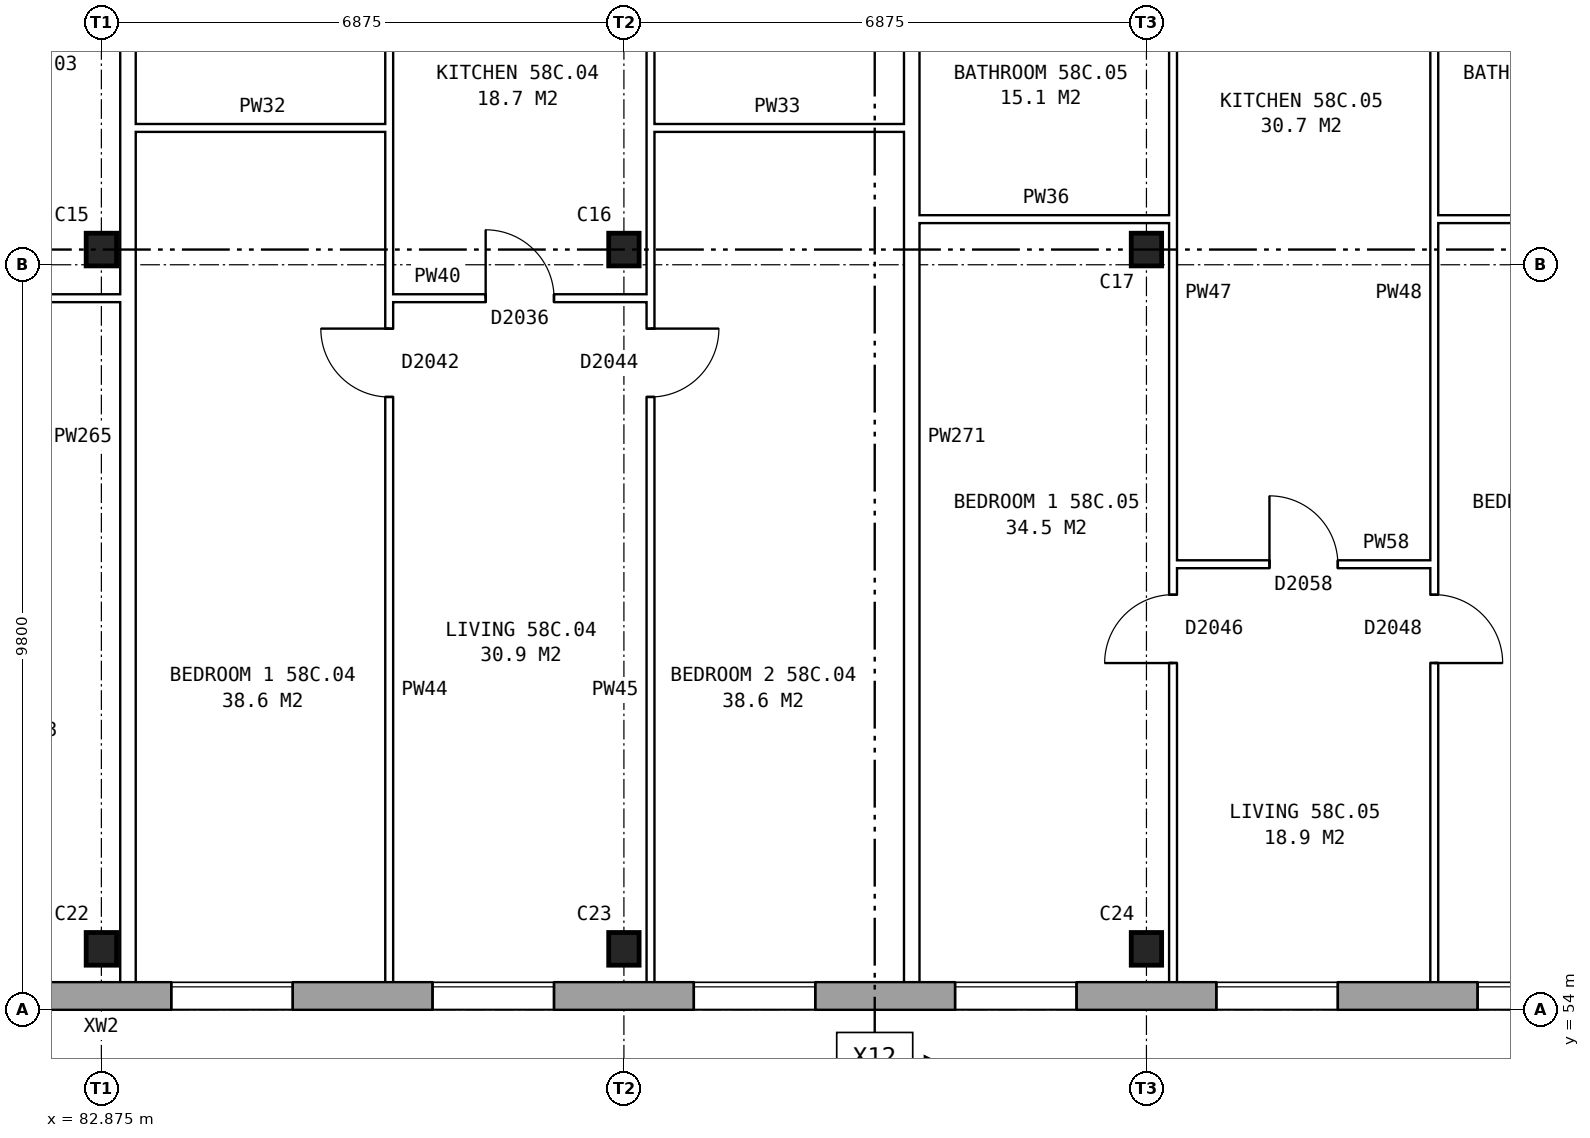
"""IFC4 building model, lengths in metres.
Left out: names, types, materials, properties, quantities, classifications, styles, units other than length and angle.
Written with IfcOpenShell. Run it as: python <this file> out.ifc"""

import sys

from ifc_helpers import new_model, si_unit, direction, frame, frame_2d, origin, origin_2d, place, context, subcontext, project, spatial, rectangle, i_section, extrude, element, fill, save


model = new_model("IFC4")
c1 = context("Model", 3, precision=1e-05, world=origin(), true_north=direction((0.0, 1.0)))
c2 = subcontext(c1, "Body", "Model", "MODEL_VIEW")
j1 = project(units=[si_unit("LENGTHUNIT", "METRE"), si_unit("PLANEANGLEUNIT", "RADIAN")], contexts=[c1])
p1 = place(None, origin())
s1 = spatial("IfcSite", under=j1, at=p1, CompositionType="ELEMENT")
p2 = place(p1, origin())
s2 = spatial("IfcBuilding", under=s1, at=p2, CompositionType="ELEMENT")
p3 = place(p2, frame((0.0, 0.0, 205.9)))
s3 = spatial("IfcBuildingStorey", under=s2, at=p3, CompositionType="ELEMENT", Elevation=205.9)
for number, where, z_axis, x_axis in (
    (1, (82.875, 54.8, 0.0), (0.0, 0.0, 1.0), (1.0, 0.0, 0.0)),
    (2, (89.75, 54.8, 0.0), (0.0, 0.0, 1.0), (1.0, 0.0, 0.0)),
    (3, (96.625, 54.8, 0.0), (0.0, 0.0, 1.0), (1.0, 0.0, 0.0)),
    (4, (82.875, 64.0, 0.0), (0.0, 0.0, 1.0), (1.0, 0.0, 0.0)),
    (5, (89.75, 64.0, 0.0), (0.0, 0.0, 1.0), (1.0, 0.0, 0.0)),
    (6, (96.625, 64.0, 0.0), (0.0, 0.0, 1.0), (1.0, 0.0, 0.0)),
):
    element("IfcColumn", number, at=place(p3, frame(where, z_axis=z_axis, x_axis=x_axis)), inside=s3, PredefinedType="COLUMN", context=c2, shape_type="SweptSolid", body=[
        extrude(i_section(OverallWidth=0.4, OverallDepth=0.43, WebThickness=0.04, FlangeThickness=0.04, at=origin_2d()), origin(), (0.0, 0.0, 1.0), 2.85),
    ])
p4 = place(p3, frame((75.95, 54.18, 0.0), z_axis=(0.0, 0.0, 1.0), x_axis=(1.0, 0.0, 0.0)))
e7 = element("IfcWall", 7, at=p4, inside=s3, PredefinedType="STANDARD", context=c2, shape_type="SweptSolid", body=[
    extrude(rectangle(XDim=55.1, YDim=0.36, at=frame_2d((27.55, 0.0))), origin(), (0.0, 0.0, 1.0), 2.85),
])
p5 = place(p4, frame((0.969, 0.0, 0.8)))
e8 = element("IfcOpeningElement", 8, at=p5, cuts=e7, PredefinedType="OPENING", context=c2, shape_type="SweptSolid", body=[
    extrude(rectangle(XDim=1.6, YDim=1.8, at=frame_2d((0.8, 0.9))), frame((0.0, 0.19, 0.0), z_axis=(0.0, -1.0, 0.0), x_axis=(1.0, 0.0, 0.0)), (0.0, 0.0, 1.0), 0.38),
])
p6 = place(p4, frame((4.406, 0.0, 0.8)))
e9 = element("IfcOpeningElement", 9, at=p6, cuts=e7, PredefinedType="OPENING", context=c2, shape_type="SweptSolid", body=[
    extrude(rectangle(XDim=1.6, YDim=1.8, at=frame_2d((0.8, 0.9))), frame((0.0, 0.19, 0.0), z_axis=(0.0, -1.0, 0.0), x_axis=(1.0, 0.0, 0.0)), (0.0, 0.0, 1.0), 0.38),
])
p7 = place(p4, frame((7.844, 0.0, 0.8)))
e10 = element("IfcOpeningElement", 10, at=p7, cuts=e7, PredefinedType="OPENING", context=c2, shape_type="SweptSolid", body=[
    extrude(rectangle(XDim=1.6, YDim=1.8, at=frame_2d((0.8, 0.9))), frame((0.0, 0.19, 0.0), z_axis=(0.0, -1.0, 0.0), x_axis=(1.0, 0.0, 0.0)), (0.0, 0.0, 1.0), 0.38),
])
p8 = place(p4, frame((11.281, 0.0, 0.8)))
e11 = element("IfcOpeningElement", 11, at=p8, cuts=e7, PredefinedType="OPENING", context=c2, shape_type="SweptSolid", body=[
    extrude(rectangle(XDim=1.6, YDim=1.8, at=frame_2d((0.8, 0.9))), frame((0.0, 0.19, 0.0), z_axis=(0.0, -1.0, 0.0), x_axis=(1.0, 0.0, 0.0)), (0.0, 0.0, 1.0), 0.38),
])
p9 = place(p4, frame((14.719, 0.0, 0.8)))
e12 = element("IfcOpeningElement", 12, at=p9, cuts=e7, PredefinedType="OPENING", context=c2, shape_type="SweptSolid", body=[
    extrude(rectangle(XDim=1.6, YDim=1.8, at=frame_2d((0.8, 0.9))), frame((0.0, 0.19, 0.0), z_axis=(0.0, -1.0, 0.0), x_axis=(1.0, 0.0, 0.0)), (0.0, 0.0, 1.0), 0.38),
])
p10 = place(p4, frame((18.156, 0.0, 0.8)))
e13 = element("IfcOpeningElement", 13, at=p10, cuts=e7, PredefinedType="OPENING", context=c2, shape_type="SweptSolid", body=[
    extrude(rectangle(XDim=1.6, YDim=1.8, at=frame_2d((0.8, 0.9))), frame((0.0, 0.19, 0.0), z_axis=(0.0, -1.0, 0.0), x_axis=(1.0, 0.0, 0.0)), (0.0, 0.0, 1.0), 0.38),
])
p11 = place(p4, frame((21.594, 0.0, 0.8)))
e14 = element("IfcOpeningElement", 14, at=p11, cuts=e7, PredefinedType="OPENING", context=c2, shape_type="SweptSolid", body=[
    extrude(rectangle(XDim=1.6, YDim=1.8, at=frame_2d((0.8, 0.9))), frame((0.0, 0.19, 0.0), z_axis=(0.0, -1.0, 0.0), x_axis=(1.0, 0.0, 0.0)), (0.0, 0.0, 1.0), 0.38),
])
p12 = place(p4, frame((25.031, 0.0, 0.8)))
e15 = element("IfcOpeningElement", 15, at=p12, cuts=e7, PredefinedType="OPENING", context=c2, shape_type="SweptSolid", body=[
    extrude(rectangle(XDim=1.6, YDim=1.8, at=frame_2d((0.8, 0.9))), frame((0.0, 0.19, 0.0), z_axis=(0.0, -1.0, 0.0), x_axis=(1.0, 0.0, 0.0)), (0.0, 0.0, 1.0), 0.38),
])
p13 = place(p4, frame((28.469, 0.0, 0.8)))
e16 = element("IfcOpeningElement", 16, at=p13, cuts=e7, PredefinedType="OPENING", context=c2, shape_type="SweptSolid", body=[
    extrude(rectangle(XDim=1.6, YDim=1.8, at=frame_2d((0.8, 0.9))), frame((0.0, 0.19, 0.0), z_axis=(0.0, -1.0, 0.0), x_axis=(1.0, 0.0, 0.0)), (0.0, 0.0, 1.0), 0.38),
])
p14 = place(p4, frame((31.906, 0.0, 0.8)))
e17 = element("IfcOpeningElement", 17, at=p14, cuts=e7, PredefinedType="OPENING", context=c2, shape_type="SweptSolid", body=[
    extrude(rectangle(XDim=1.6, YDim=1.8, at=frame_2d((0.8, 0.9))), frame((0.0, 0.19, 0.0), z_axis=(0.0, -1.0, 0.0), x_axis=(1.0, 0.0, 0.0)), (0.0, 0.0, 1.0), 0.38),
])
p15 = place(p4, frame((35.344, 0.0, 0.8)))
e18 = element("IfcOpeningElement", 18, at=p15, cuts=e7, PredefinedType="OPENING", context=c2, shape_type="SweptSolid", body=[
    extrude(rectangle(XDim=1.6, YDim=1.8, at=frame_2d((0.8, 0.9))), frame((0.0, 0.19, 0.0), z_axis=(0.0, -1.0, 0.0), x_axis=(1.0, 0.0, 0.0)), (0.0, 0.0, 1.0), 0.38),
])
p16 = place(p4, frame((38.781, 0.0, 0.8)))
e19 = element("IfcOpeningElement", 19, at=p16, cuts=e7, PredefinedType="OPENING", context=c2, shape_type="SweptSolid", body=[
    extrude(rectangle(XDim=1.6, YDim=1.8, at=frame_2d((0.8, 0.9))), frame((0.0, 0.19, 0.0), z_axis=(0.0, -1.0, 0.0), x_axis=(1.0, 0.0, 0.0)), (0.0, 0.0, 1.0), 0.38),
])
p17 = place(p4, frame((42.219, 0.0, 0.8)))
e20 = element("IfcOpeningElement", 20, at=p17, cuts=e7, PredefinedType="OPENING", context=c2, shape_type="SweptSolid", body=[
    extrude(rectangle(XDim=1.6, YDim=1.8, at=frame_2d((0.8, 0.9))), frame((0.0, 0.19, 0.0), z_axis=(0.0, -1.0, 0.0), x_axis=(1.0, 0.0, 0.0)), (0.0, 0.0, 1.0), 0.38),
])
p18 = place(p4, frame((45.656, 0.0, 0.8)))
e21 = element("IfcOpeningElement", 21, at=p18, cuts=e7, PredefinedType="OPENING", context=c2, shape_type="SweptSolid", body=[
    extrude(rectangle(XDim=1.6, YDim=1.8, at=frame_2d((0.8, 0.9))), frame((0.0, 0.19, 0.0), z_axis=(0.0, -1.0, 0.0), x_axis=(1.0, 0.0, 0.0)), (0.0, 0.0, 1.0), 0.38),
])
p19 = place(p4, frame((49.094, 0.0, 0.8)))
e22 = element("IfcOpeningElement", 22, at=p19, cuts=e7, PredefinedType="OPENING", context=c2, shape_type="SweptSolid", body=[
    extrude(rectangle(XDim=1.6, YDim=1.8, at=frame_2d((0.8, 0.9))), frame((0.0, 0.19, 0.0), z_axis=(0.0, -1.0, 0.0), x_axis=(1.0, 0.0, 0.0)), (0.0, 0.0, 1.0), 0.38),
])
p20 = place(p4, frame((52.531, 0.0, 0.8)))
e23 = element("IfcOpeningElement", 23, at=p20, cuts=e7, PredefinedType="OPENING", context=c2, shape_type="SweptSolid", body=[
    extrude(rectangle(XDim=1.6, YDim=1.8, at=frame_2d((0.8, 0.9))), frame((0.0, 0.19, 0.0), z_axis=(0.0, -1.0, 0.0), x_axis=(1.0, 0.0, 0.0)), (0.0, 0.0, 1.0), 0.38),
])
p21 = place(p3, frame((96.975, 59.86, 0.0), z_axis=(0.0, 0.0, 1.0), x_axis=(1.0, 0.0, 0.0)))
e24 = element("IfcWall", 24, at=p21, inside=s3, PredefinedType="PARTITIONING", context=c2, shape_type="SweptSolid", body=[
    extrude(rectangle(XDim=3.437, YDim=0.1, at=frame_2d((1.719, 0.0))), origin(), (0.0, 0.0, 1.0), 2.85),
])
p22 = place(p21, frame((1.269, 0.0, 0.0)))
e25 = element("IfcOpeningElement", 25, at=p22, cuts=e24, PredefinedType="OPENING", context=c2, shape_type="SweptSolid", body=[
    extrude(rectangle(XDim=0.9, YDim=2.1, at=frame_2d((0.45, 1.05))), frame((0.0, 0.06, 0.0), z_axis=(0.0, -1.0, 0.0), x_axis=(1.0, 0.0, 0.0)), (0.0, 0.0, 1.0), 0.12),
])
p23 = place(p3, frame((79.438, 63.36, 0.0), z_axis=(0.0, 0.0, 1.0), x_axis=(1.0, 0.0, 0.0)))
e26 = element("IfcWall", 26, at=p23, inside=s3, PredefinedType="PARTITIONING", context=c2, shape_type="SweptSolid", body=[
    extrude(rectangle(XDim=3.687, YDim=0.1, at=frame_2d((1.844, 0.0))), origin(), (0.0, 0.0, 1.0), 2.85),
])
p24 = place(p23, frame((1.394, 0.0, 0.0)))
e27 = element("IfcOpeningElement", 27, at=p24, cuts=e26, PredefinedType="OPENING", context=c2, shape_type="SweptSolid", body=[
    extrude(rectangle(XDim=0.9, YDim=2.1, at=frame_2d((0.45, 1.05))), frame((0.0, 0.06, 0.0), z_axis=(0.0, -1.0, 0.0), x_axis=(1.0, 0.0, 0.0)), (0.0, 0.0, 1.0), 0.12),
])
p25 = place(p3, frame((86.662, 63.36, 0.0), z_axis=(0.0, 0.0, 1.0), x_axis=(1.0, 0.0, 0.0)))
e28 = element("IfcWall", 28, at=p25, inside=s3, PredefinedType="PARTITIONING", context=c2, shape_type="SweptSolid", body=[
    extrude(rectangle(XDim=3.438, YDim=0.1, at=frame_2d((1.719, 0.0))), origin(), (0.0, 0.0, 1.0), 2.85),
])
p26 = place(p25, frame((1.269, 0.0, 0.0)))
e29 = element("IfcOpeningElement", 29, at=p26, cuts=e28, PredefinedType="OPENING", context=c2, shape_type="SweptSolid", body=[
    extrude(rectangle(XDim=0.9, YDim=2.1, at=frame_2d((0.45, 1.05))), frame((0.0, 0.06, 0.0), z_axis=(0.0, -1.0, 0.0), x_axis=(1.0, 0.0, 0.0)), (0.0, 0.0, 1.0), 0.12),
])
p27 = place(p3, frame((93.637, 64.4, 0.0), z_axis=(0.0, 0.0, 1.0), x_axis=(1.0, 0.0, 0.0)))
e30 = element("IfcWall", 30, at=p27, inside=s3, PredefinedType="PARTITIONING", context=c2, shape_type="SweptSolid", body=[
    extrude(rectangle(XDim=3.338, YDim=0.1, at=frame_2d((1.669, 0.0))), origin(), (0.0, 0.0, 1.0), 2.85),
])
p28 = place(p3, frame((100.412, 64.4, 0.0), z_axis=(0.0, 0.0, 1.0), x_axis=(1.0, 0.0, 0.0)))
e31 = element("IfcWall", 31, at=p28, inside=s3, PredefinedType="PARTITIONING", context=c2, shape_type="SweptSolid", body=[
    extrude(rectangle(XDim=6.875, YDim=0.1, at=frame_2d((3.438, 0.0))), origin(), (0.0, 0.0, 1.0), 2.85),
])
p29 = place(p3, frame((83.325, 65.6, 0.0), z_axis=(0.0, 0.0, 1.0), x_axis=(1.0, 0.0, 0.0)))
e32 = element("IfcWall", 32, at=p29, inside=s3, PredefinedType="PARTITIONING", context=c2, shape_type="SweptSolid", body=[
    extrude(rectangle(XDim=3.337, YDim=0.1, at=frame_2d((1.668, 0.0))), origin(), (0.0, 0.0, 1.0), 2.85),
])
p30 = place(p3, frame((90.1, 65.6, 0.0), z_axis=(0.0, 0.0, 1.0), x_axis=(1.0, 0.0, 0.0)))
e33 = element("IfcWall", 33, at=p30, inside=s3, PredefinedType="PARTITIONING", context=c2, shape_type="SweptSolid", body=[
    extrude(rectangle(XDim=3.337, YDim=0.1, at=frame_2d((1.668, 0.0))), origin(), (0.0, 0.0, 1.0), 2.85),
])
p31 = place(p3, frame((83.225, 54.36, 0.0), z_axis=(0.0, 0.0, 1.0), x_axis=(0.0, 1.0, 0.0)))
e34 = element("IfcWall", 34, at=p31, inside=s3, PredefinedType="PARTITIONING", context=c2, shape_type="SweptSolid", body=[
    extrude(rectangle(XDim=14.34, YDim=0.2, at=frame_2d((7.17, 0.0))), origin(), (0.0, 0.0, 1.0), 2.85),
])
p32 = place(p3, frame((86.662, 54.36, 0.0), z_axis=(0.0, 0.0, 1.0), x_axis=(0.0, 1.0, 0.0)))
e35 = element("IfcWall", 35, at=p32, inside=s3, PredefinedType="PARTITIONING", context=c2, shape_type="SweptSolid", body=[
    extrude(rectangle(XDim=14.34, YDim=0.1, at=frame_2d((7.17, 0.0))), origin(), (0.0, 0.0, 1.0), 2.85),
])
p33 = place(p32, frame((7.7, 0.0, 0.0)))
e36 = element("IfcOpeningElement", 36, at=p33, cuts=e35, PredefinedType="OPENING", context=c2, shape_type="SweptSolid", body=[
    extrude(rectangle(XDim=0.9, YDim=2.1, at=frame_2d((0.45, 1.05))), frame((0.0, 0.06, 0.0), z_axis=(0.0, -1.0, 0.0), x_axis=(1.0, 0.0, 0.0)), (0.0, 0.0, 1.0), 0.12),
])
p34 = place(p32, frame((13.04, 0.0, 0.0)))
e37 = element("IfcOpeningElement", 37, at=p34, cuts=e35, PredefinedType="OPENING", context=c2, shape_type="SweptSolid", body=[
    extrude(rectangle(XDim=0.9, YDim=2.1, at=frame_2d((0.45, 1.05))), frame((0.0, 0.06, 0.0), z_axis=(0.0, -1.0, 0.0), x_axis=(1.0, 0.0, 0.0)), (0.0, 0.0, 1.0), 0.12),
])
p35 = place(p3, frame((90.1, 54.36, 0.0), z_axis=(0.0, 0.0, 1.0), x_axis=(0.0, 1.0, 0.0)))
e38 = element("IfcWall", 38, at=p35, inside=s3, PredefinedType="PARTITIONING", context=c2, shape_type="SweptSolid", body=[
    extrude(rectangle(XDim=14.34, YDim=0.1, at=frame_2d((7.17, 0.0))), origin(), (0.0, 0.0, 1.0), 2.85),
])
p36 = place(p35, frame((7.7, 0.0, 0.0)))
e39 = element("IfcOpeningElement", 39, at=p36, cuts=e38, PredefinedType="OPENING", context=c2, shape_type="SweptSolid", body=[
    extrude(rectangle(XDim=0.9, YDim=2.1, at=frame_2d((0.45, 1.05))), frame((0.0, 0.06, 0.0), z_axis=(0.0, -1.0, 0.0), x_axis=(1.0, 0.0, 0.0)), (0.0, 0.0, 1.0), 0.12),
])
p37 = place(p35, frame((13.04, 0.0, 0.0)))
e40 = element("IfcOpeningElement", 40, at=p37, cuts=e38, PredefinedType="OPENING", context=c2, shape_type="SweptSolid", body=[
    extrude(rectangle(XDim=0.9, YDim=2.1, at=frame_2d((0.45, 1.05))), frame((0.0, 0.06, 0.0), z_axis=(0.0, -1.0, 0.0), x_axis=(1.0, 0.0, 0.0)), (0.0, 0.0, 1.0), 0.12),
])
p38 = place(p3, frame((93.537, 54.36, 0.0), z_axis=(0.0, 0.0, 1.0), x_axis=(0.0, 1.0, 0.0)))
e41 = element("IfcWall", 41, at=p38, inside=s3, PredefinedType="PARTITIONING", context=c2, shape_type="SweptSolid", body=[
    extrude(rectangle(XDim=14.34, YDim=0.2, at=frame_2d((7.17, 0.0))), origin(), (0.0, 0.0, 1.0), 2.85),
])
p39 = place(p3, frame((96.975, 54.36, 0.0), z_axis=(0.0, 0.0, 1.0), x_axis=(0.0, 1.0, 0.0)))
e42 = element("IfcWall", 42, at=p39, inside=s3, PredefinedType="PARTITIONING", context=c2, shape_type="SweptSolid", body=[
    extrude(rectangle(XDim=14.34, YDim=0.1, at=frame_2d((7.17, 0.0))), origin(), (0.0, 0.0, 1.0), 2.85),
])
p40 = place(p39, frame((4.2, 0.0, 0.0)))
e43 = element("IfcOpeningElement", 43, at=p40, cuts=e42, PredefinedType="OPENING", context=c2, shape_type="SweptSolid", body=[
    extrude(rectangle(XDim=0.9, YDim=2.1, at=frame_2d((0.45, 1.05))), frame((0.0, 0.06, 0.0), z_axis=(0.0, -1.0, 0.0), x_axis=(1.0, 0.0, 0.0)), (0.0, 0.0, 1.0), 0.12),
])
p41 = place(p39, frame((13.04, 0.0, 0.0)))
e44 = element("IfcOpeningElement", 44, at=p41, cuts=e42, PredefinedType="OPENING", context=c2, shape_type="SweptSolid", body=[
    extrude(rectangle(XDim=0.9, YDim=2.1, at=frame_2d((0.45, 1.05))), frame((0.0, 0.06, 0.0), z_axis=(0.0, -1.0, 0.0), x_axis=(1.0, 0.0, 0.0)), (0.0, 0.0, 1.0), 0.12),
])
p42 = place(p3, frame((100.412, 54.36, 0.0), z_axis=(0.0, 0.0, 1.0), x_axis=(0.0, 1.0, 0.0)))
e45 = element("IfcWall", 45, at=p42, inside=s3, PredefinedType="PARTITIONING", context=c2, shape_type="SweptSolid", body=[
    extrude(rectangle(XDim=14.34, YDim=0.1, at=frame_2d((7.17, 0.0))), origin(), (0.0, 0.0, 1.0), 2.85),
])
p43 = place(p42, frame((4.2, 0.0, 0.0)))
e46 = element("IfcOpeningElement", 46, at=p43, cuts=e45, PredefinedType="OPENING", context=c2, shape_type="SweptSolid", body=[
    extrude(rectangle(XDim=0.9, YDim=2.1, at=frame_2d((0.45, 1.05))), frame((0.0, 0.06, 0.0), z_axis=(0.0, -1.0, 0.0), x_axis=(1.0, 0.0, 0.0)), (0.0, 0.0, 1.0), 0.12),
])
p44 = place(p42, frame((13.04, 0.0, 0.0)))
e47 = element("IfcOpeningElement", 47, at=p44, cuts=e45, PredefinedType="OPENING", context=c2, shape_type="SweptSolid", body=[
    extrude(rectangle(XDim=0.9, YDim=2.1, at=frame_2d((0.45, 1.05))), frame((0.0, 0.06, 0.0), z_axis=(0.0, -1.0, 0.0), x_axis=(1.0, 0.0, 0.0)), (0.0, 0.0, 1.0), 0.12),
])
p45 = place(p7, origin())
e48 = element("IfcWindow", 48, at=p45, inside=s3, PartitioningType="SINGLE_PANEL", PredefinedType="WINDOW", context=c2, shape_type="SweptSolid", body=[
    extrude(rectangle(XDim=1.6, YDim=1.8, at=frame_2d((0.8, 0.9))), frame((0.0, 0.15, 0.0), z_axis=(0.0, -1.0, 0.0), x_axis=(1.0, 0.0, 0.0)), (0.0, 0.0, 1.0), 0.06),
])
fill(e10, e48)
p46 = place(p8, origin())
e49 = element("IfcWindow", 49, at=p46, inside=s3, PartitioningType="SINGLE_PANEL", PredefinedType="WINDOW", context=c2, shape_type="SweptSolid", body=[
    extrude(rectangle(XDim=1.6, YDim=1.8, at=frame_2d((0.8, 0.9))), frame((0.0, 0.15, 0.0), z_axis=(0.0, -1.0, 0.0), x_axis=(1.0, 0.0, 0.0)), (0.0, 0.0, 1.0), 0.06),
])
fill(e11, e49)
p47 = place(p9, origin())
e50 = element("IfcWindow", 50, at=p47, inside=s3, PartitioningType="SINGLE_PANEL", PredefinedType="WINDOW", context=c2, shape_type="SweptSolid", body=[
    extrude(rectangle(XDim=1.6, YDim=1.8, at=frame_2d((0.8, 0.9))), frame((0.0, 0.15, 0.0), z_axis=(0.0, -1.0, 0.0), x_axis=(1.0, 0.0, 0.0)), (0.0, 0.0, 1.0), 0.06),
])
fill(e12, e50)
p48 = place(p10, origin())
e51 = element("IfcWindow", 51, at=p48, inside=s3, PartitioningType="SINGLE_PANEL", PredefinedType="WINDOW", context=c2, shape_type="SweptSolid", body=[
    extrude(rectangle(XDim=1.6, YDim=1.8, at=frame_2d((0.8, 0.9))), frame((0.0, 0.15, 0.0), z_axis=(0.0, -1.0, 0.0), x_axis=(1.0, 0.0, 0.0)), (0.0, 0.0, 1.0), 0.06),
])
fill(e13, e51)
p49 = place(p11, origin())
e52 = element("IfcWindow", 52, at=p49, inside=s3, PartitioningType="SINGLE_PANEL", PredefinedType="WINDOW", context=c2, shape_type="SweptSolid", body=[
    extrude(rectangle(XDim=1.6, YDim=1.8, at=frame_2d((0.8, 0.9))), frame((0.0, 0.15, 0.0), z_axis=(0.0, -1.0, 0.0), x_axis=(1.0, 0.0, 0.0)), (0.0, 0.0, 1.0), 0.06),
])
fill(e14, e52)
p50 = place(p12, origin())
e53 = element("IfcWindow", 53, at=p50, inside=s3, PartitioningType="SINGLE_PANEL", PredefinedType="WINDOW", context=c2, shape_type="SweptSolid", body=[
    extrude(rectangle(XDim=1.6, YDim=1.8, at=frame_2d((0.8, 0.9))), frame((0.0, 0.15, 0.0), z_axis=(0.0, -1.0, 0.0), x_axis=(1.0, 0.0, 0.0)), (0.0, 0.0, 1.0), 0.06),
])
fill(e15, e53)
p51 = place(p33, origin())
e54 = element("IfcDoor", 54, at=p51, inside=s3, OperationType="SINGLE_SWING_RIGHT", PredefinedType="DOOR", context=c2, shape_type="SweptSolid", body=[
    extrude(rectangle(XDim=0.9, YDim=2.1, at=frame_2d((0.45, 1.05))), frame((0.0, 0.025, 0.0), z_axis=(0.0, -1.0, 0.0), x_axis=(1.0, 0.0, 0.0)), (0.0, 0.0, 1.0), 0.05),
])
fill(e36, e54)
p52 = place(p36, frame((0.9, 0.0, 0.0), z_axis=(0.0, 0.0, 1.0), x_axis=(-1.0, 0.0, 0.0)))
e55 = element("IfcDoor", 55, at=p52, inside=s3, OperationType="SINGLE_SWING_LEFT", PredefinedType="DOOR", context=c2, shape_type="SweptSolid", body=[
    extrude(rectangle(XDim=0.9, YDim=2.1, at=frame_2d((0.45, 1.05))), frame((0.0, 0.025, 0.0), z_axis=(0.0, -1.0, 0.0), x_axis=(1.0, 0.0, 0.0)), (0.0, 0.0, 1.0), 0.05),
])
fill(e39, e55)
p53 = place(p26, origin())
e56 = element("IfcDoor", 56, at=p53, inside=s3, OperationType="SINGLE_SWING_LEFT", PredefinedType="DOOR", context=c2, shape_type="SweptSolid", body=[
    extrude(rectangle(XDim=0.9, YDim=2.1, at=frame_2d((0.45, 1.05))), frame((0.0, 0.025, 0.0), z_axis=(0.0, -1.0, 0.0), x_axis=(1.0, 0.0, 0.0)), (0.0, 0.0, 1.0), 0.05),
])
fill(e29, e56)
p54 = place(p40, origin())
e57 = element("IfcDoor", 57, at=p54, inside=s3, OperationType="SINGLE_SWING_LEFT", PredefinedType="DOOR", context=c2, shape_type="SweptSolid", body=[
    extrude(rectangle(XDim=0.9, YDim=2.1, at=frame_2d((0.45, 1.05))), frame((0.0, 0.025, 0.0), z_axis=(0.0, -1.0, 0.0), x_axis=(1.0, 0.0, 0.0)), (0.0, 0.0, 1.0), 0.05),
])
fill(e43, e57)
p55 = place(p43, frame((0.9, 0.0, 0.0), z_axis=(0.0, 0.0, 1.0), x_axis=(-1.0, 0.0, 0.0)))
e58 = element("IfcDoor", 58, at=p55, inside=s3, OperationType="SINGLE_SWING_RIGHT", PredefinedType="DOOR", context=c2, shape_type="SweptSolid", body=[
    extrude(rectangle(XDim=0.9, YDim=2.1, at=frame_2d((0.45, 1.05))), frame((0.0, 0.025, 0.0), z_axis=(0.0, -1.0, 0.0), x_axis=(1.0, 0.0, 0.0)), (0.0, 0.0, 1.0), 0.05),
])
fill(e46, e58)
p56 = place(p22, origin())
e59 = element("IfcDoor", 59, at=p56, inside=s3, OperationType="SINGLE_SWING_LEFT", PredefinedType="DOOR", context=c2, shape_type="SweptSolid", body=[
    extrude(rectangle(XDim=0.9, YDim=2.1, at=frame_2d((0.45, 1.05))), frame((0.0, 0.025, 0.0), z_axis=(0.0, -1.0, 0.0), x_axis=(1.0, 0.0, 0.0)), (0.0, 0.0, 1.0), 0.05),
])
fill(e25, e59)
save(model, sys.argv[1])
